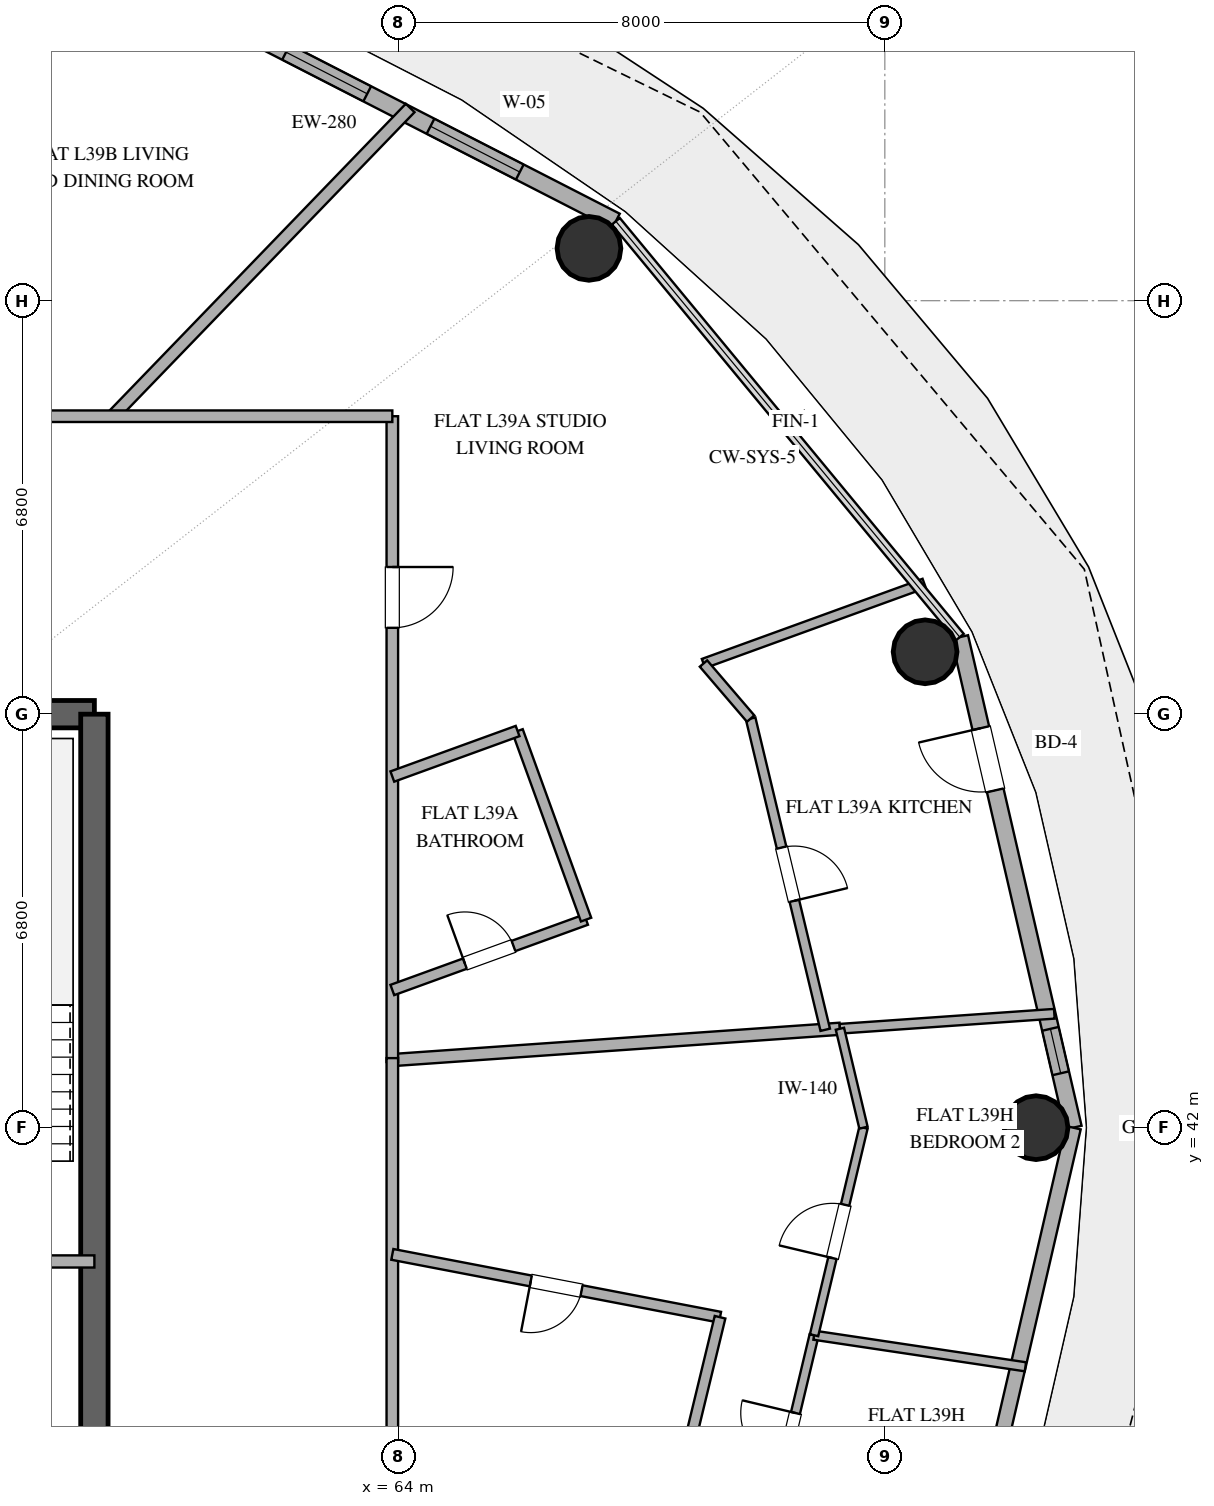
"""IFC4 building model, lengths in metres.
Left out: names, types, materials, properties, quantities, classifications, styles, units other than length and angle.
Written with IfcOpenShell. Run it as: python <this file> out.ifc"""

import sys

from ifc_helpers import new_model, si_unit, direction, frame, frame_2d, origin, origin_2d, place, context, subcontext, project, spatial, rectangle, hollow_circle, extrude, element, fill, save


model = new_model("IFC4")
c1 = context("Model", 3, precision=1e-05, world=origin(), true_north=direction((0.0, 1.0)))
c2 = subcontext(c1, "Body", "Model", "MODEL_VIEW")
j1 = project(units=[si_unit("LENGTHUNIT", "METRE"), si_unit("PLANEANGLEUNIT", "RADIAN")], contexts=[c1])
p1 = place(None, origin())
s1 = spatial("IfcSite", under=j1, at=p1, CompositionType="ELEMENT")
p2 = place(p1, origin())
s2 = spatial("IfcBuilding", under=s1, at=p2, CompositionType="ELEMENT")
p3 = place(p2, frame((0.0, 0.0, 157.8)))
s3 = spatial("IfcBuildingStorey", under=s2, at=p3, CompositionType="ELEMENT", Elevation=157.8)
p4 = place(p3, frame((55.0, 48.8, 0.0), z_axis=(0.0, 0.0, 1.0), x_axis=(1.0, 0.0, 0.0)))
e1 = element("IfcWall", 1, at=p4, inside=s3, PredefinedType="SHEAR", context=c2, shape_type="SweptSolid", body=[
    extrude(rectangle(XDim=4.0, YDim=0.45, at=frame_2d((2.0, 0.0))), origin(), (0.0, 0.0, 1.0), 3.38),
])
p5 = place(p3, frame((59.0, 35.2, 0.0), z_axis=(0.0, 0.0, 1.0), x_axis=(0.0, 1.0, 0.0)))
e2 = element("IfcWall", 2, at=p5, inside=s3, PredefinedType="SHEAR", context=c2, shape_type="SweptSolid", body=[
    extrude(rectangle(XDim=13.6, YDim=0.45, at=frame_2d((6.8, 0.0))), origin(), (0.0, 0.0, 1.0), 3.38),
])
for number, where, z_axis, x_axis in (
    (3, (74.487, 42.0, 0.0), (0.0, 0.0, 1.0), (1.0, 0.0, 0.0)),
    (4, (72.662, 49.826, 0.0), (0.0, 0.0, 1.0), (1.0, 0.0, 0.0)),
    (5, (67.134, 56.46, 0.0), (0.0, 0.0, 1.0), (1.0, 0.0, 0.0)),
):
    element("IfcColumn", number, at=place(p3, frame(where, z_axis=z_axis, x_axis=x_axis)), inside=s3, PredefinedType="COLUMN", context=c2, shape_type="SweptSolid", body=[
        extrude(hollow_circle(Radius=0.525, WallThickness=0.028, at=origin_2d()), origin(), (0.0, 0.0, 1.0), 3.38),
    ])
p6 = place(p3, frame((75.099, 42.0, 0.0), z_axis=(0.0, 0.0, 1.0), x_axis=(-0.225473184558, 0.974249374157, 0.0)))
e6 = element("IfcWall", 6, at=p6, inside=s3, PredefinedType="SOLIDWALL", context=c2, shape_type="SweptSolid", body=[
    extrude(rectangle(XDim=8.28, YDim=0.28, at=frame_2d((4.14, 0.0))), origin(), (0.0, 0.0, 1.0), 3.38),
])
p7 = place(p6, frame((5.694, 0.0, 0.0)))
e7 = element("IfcOpeningElement", 7, at=p7, cuts=e6, PredefinedType="OPENING", context=c2, shape_type="SweptSolid", body=[
    extrude(rectangle(XDim=1.05, YDim=2.2, at=frame_2d((0.525, 1.1))), frame((0.0, 0.15, 0.0), z_axis=(0.0, -1.0, 0.0), x_axis=(1.0, 0.0, 0.0)), (0.0, 0.0, 1.0), 0.3),
])
p8 = place(p6, frame((0.918, 0.0, 0.85)))
e8 = element("IfcOpeningElement", 8, at=p8, cuts=e6, PredefinedType="OPENING", context=c2, shape_type="SweptSolid", body=[
    extrude(rectangle(XDim=0.75, YDim=1.8, at=frame_2d((0.375, 0.9))), frame((0.0, 0.15, 0.0), z_axis=(0.0, -1.0, 0.0), x_axis=(1.0, 0.0, 0.0)), (0.0, 0.0, 1.0), 0.3),
])
p9 = place(p3, frame((67.576, 56.906, 0.0), z_axis=(0.0, 0.0, 1.0), x_axis=(-0.889872523182, 0.456209263919, 0.0)))
e9 = element("IfcWall", 9, at=p9, inside=s3, PredefinedType="SOLIDWALL", context=c2, shape_type="SweptSolid", body=[
    extrude(rectangle(XDim=10.016, YDim=0.28, at=frame_2d((5.008, 0.0))), origin(), (0.0, 0.0, 1.0), 3.38),
])
p10 = place(p9, frame((1.775, 0.0, 0.85)))
e10 = element("IfcOpeningElement", 10, at=p10, cuts=e9, PredefinedType="OPENING", context=c2, shape_type="SweptSolid", body=[
    extrude(rectangle(XDim=1.65, YDim=2.0, at=frame_2d((0.825, 1.0))), frame((0.0, 0.15, 0.0), z_axis=(0.0, -1.0, 0.0), x_axis=(1.0, 0.0, 0.0)), (0.0, 0.0, 1.0), 0.3),
])
p11 = place(p9, frame((4.595, 0.0, 0.85)))
e11 = element("IfcOpeningElement", 11, at=p11, cuts=e9, PredefinedType="OPENING", context=c2, shape_type="SweptSolid", body=[
    extrude(rectangle(XDim=1.5, YDim=2.0, at=frame_2d((0.75, 1.0))), frame((0.0, 0.15, 0.0), z_axis=(0.0, -1.0, 0.0), x_axis=(1.0, 0.0, 0.0)), (0.0, 0.0, 1.0), 0.3),
])
p12 = place(p9, frame((6.58, 0.0, 0.85)))
e12 = element("IfcOpeningElement", 12, at=p12, cuts=e9, PredefinedType="OPENING", context=c2, shape_type="SweptSolid", body=[
    extrude(rectangle(XDim=1.5, YDim=2.0, at=frame_2d((0.75, 1.0))), frame((0.0, 0.15, 0.0), z_axis=(0.0, -1.0, 0.0), x_axis=(1.0, 0.0, 0.0)), (0.0, 0.0, 1.0), 0.3),
])
p13 = place(p3, frame((73.232, 33.933, 0.0), z_axis=(0.0, 0.0, 1.0), x_axis=(0.225473184558, 0.974249374157, 0.0)))
e13 = element("IfcWall", 13, at=p13, inside=s3, PredefinedType="SOLIDWALL", context=c2, shape_type="SweptSolid", body=[
    extrude(rectangle(XDim=8.28, YDim=0.25, at=frame_2d((4.14, 0.0))), origin(), (0.0, 0.0, 1.0), 3.38),
])
p14 = place(p13, frame((0.886, 0.0, 0.35)))
e14 = element("IfcOpeningElement", 14, at=p14, cuts=e13, PredefinedType="OPENING", context=c2, shape_type="SweptSolid", body=[
    extrude(rectangle(XDim=1.0, YDim=1.05, at=frame_2d((0.5, 0.525))), frame((0.0, 0.135, 0.0), z_axis=(0.0, -1.0, 0.0), x_axis=(1.0, 0.0, 0.0)), (0.0, 0.0, 1.0), 0.27),
])
p15 = place(p3, frame((55.0, 39.8, 0.0), z_axis=(0.0, 0.0, 1.0), x_axis=(1.0, 0.0, 0.0)))
e15 = element("IfcWall", 15, at=p15, inside=s3, PredefinedType="SOLIDWALL", context=c2, shape_type="SweptSolid", body=[
    extrude(rectangle(XDim=4.0, YDim=0.2, at=frame_2d((2.0, 0.0))), origin(), (0.0, 0.0, 1.0), 2.74),
])
p16 = place(p15, frame((1.45, 0.0, 0.0)))
e16 = element("IfcOpeningElement", 16, at=p16, cuts=e15, PredefinedType="OPENING", context=c2, shape_type="SweptSolid", body=[
    extrude(rectangle(XDim=1.1, YDim=2.15, at=frame_2d((0.55, 1.075))), frame((0.0, 0.11, 0.0), z_axis=(0.0, -1.0, 0.0), x_axis=(1.0, 0.0, 0.0)), (0.0, 0.0, 1.0), 0.22),
])
p17 = place(p3, frame((71.261, 43.627, 0.0), z_axis=(0.0, 0.0, 1.0), x_axis=(-0.997562906323, -0.069772830877, 0.0)))
e17 = element("IfcWall", 17, at=p17, inside=s3, PredefinedType="PARTITIONING", context=c2, shape_type="SweptSolid", body=[
    extrude(rectangle(XDim=7.38, YDim=0.2, at=frame_2d((3.69, 0.0))), origin(), (0.0, 0.0, 1.0), 2.74),
])
p18 = place(p3, frame((64.194, 58.769, 0.0), z_axis=(0.0, 0.0, 1.0), x_axis=(-0.694647685064, -0.719350118952, 0.0)))
e18 = element("IfcWall", 18, at=p18, inside=s3, PredefinedType="PARTITIONING", context=c2, shape_type="SweptSolid", body=[
    extrude(rectangle(XDim=7.047, YDim=0.2, at=frame_2d((3.523, 0.0))), origin(), (0.0, 0.0, 1.0), 2.74),
])
p19 = place(p3, frame((63.9, 53.7, 0.0), z_axis=(0.0, 0.0, 1.0), x_axis=(0.0, -1.0, 0.0)))
e19 = element("IfcWall", 19, at=p19, inside=s3, PredefinedType="PARTITIONING", context=c2, shape_type="SweptSolid", body=[
    extrude(rectangle(XDim=10.62, YDim=0.19, at=frame_2d((5.31, 0.0))), origin(), (0.0, 0.0, 1.0), 2.74),
])
p20 = place(p19, frame((2.48, 0.0, 0.0)))
e20 = element("IfcOpeningElement", 20, at=p20, cuts=e19, PredefinedType="OPENING", context=c2, shape_type="SweptSolid", body=[
    extrude(rectangle(XDim=1.0, YDim=2.2, at=frame_2d((0.5, 1.1))), frame((0.0, 0.105, 0.0), z_axis=(0.0, -1.0, 0.0), x_axis=(1.0, 0.0, 0.0)), (0.0, 0.0, 1.0), 0.21),
])
p21 = place(p3, frame((49.612, 53.7, 0.0), z_axis=(0.0, 0.0, 1.0), x_axis=(1.0, 0.0, 0.0)))
e21 = element("IfcWall", 21, at=p21, inside=s3, PredefinedType="PARTITIONING", context=c2, shape_type="SweptSolid", body=[
    extrude(rectangle(XDim=14.288, YDim=0.19, at=frame_2d((7.144, 0.0))), origin(), (0.0, 0.0, 1.0), 2.74),
])
p22 = place(p21, frame((6.395, 0.0, 0.0)))
e22 = element("IfcOpeningElement", 22, at=p22, cuts=e21, PredefinedType="OPENING", context=c2, shape_type="SweptSolid", body=[
    extrude(rectangle(XDim=1.0, YDim=2.2, at=frame_2d((0.5, 1.1))), frame((0.0, 0.105, 0.0), z_axis=(0.0, -1.0, 0.0), x_axis=(1.0, 0.0, 0.0)), (0.0, 0.0, 1.0), 0.21),
])
p23 = place(p3, frame((63.9, 43.144, 0.0), z_axis=(0.0, 0.0, 1.0), x_axis=(0.0, -1.0, 0.0)))
e23 = element("IfcWall", 23, at=p23, inside=s3, PredefinedType="PARTITIONING", context=c2, shape_type="SweptSolid", body=[
    extrude(rectangle(XDim=12.844, YDim=0.19, at=frame_2d((6.422, 0.0))), origin(), (0.0, 0.0, 1.0), 2.74),
])
p24 = place(p23, frame((9.529, 0.0, 0.0)))
e24 = element("IfcOpeningElement", 24, at=p24, cuts=e23, PredefinedType="OPENING", context=c2, shape_type="SweptSolid", body=[
    extrude(rectangle(XDim=1.0, YDim=2.2, at=frame_2d((0.5, 1.1))), frame((0.0, 0.105, 0.0), z_axis=(0.0, -1.0, 0.0), x_axis=(1.0, 0.0, 0.0)), (0.0, 0.0, 1.0), 0.21),
])
p25 = place(p3, frame((69.29, 38.883, 0.0), z_axis=(0.0, 0.0, 1.0), x_axis=(-0.98210182834, 0.188350733396, 0.0)))
e25 = element("IfcWall", 25, at=p25, inside=s3, PredefinedType="PLUMBINGWALL", context=c2, shape_type="SweptSolid", body=[
    extrude(rectangle(XDim=5.488, YDim=0.18, at=frame_2d((2.744, 0.0))), origin(), (0.0, 0.0, 1.0), 2.74),
])
p26 = place(p25, frame((2.319, 0.0, 0.0)))
e26 = element("IfcOpeningElement", 26, at=p26, cuts=e25, PredefinedType="OPENING", context=c2, shape_type="SweptSolid", body=[
    extrude(rectangle(XDim=0.85, YDim=2.1, at=frame_2d((0.425, 1.05))), frame((0.0, 0.1, 0.0), z_axis=(0.0, -1.0, 0.0), x_axis=(1.0, 0.0, 0.0)), (0.0, 0.0, 1.0), 0.2),
])
p27 = place(p3, frame((69.793, 48.728, 0.0), z_axis=(0.0, 0.0, 1.0), x_axis=(0.23310450522, -0.972451690135, 0.0)))
e27 = element("IfcWall", 27, at=p27, inside=s3, PredefinedType="PLUMBINGWALL", context=c2, shape_type="SweptSolid", body=[
    extrude(rectangle(XDim=5.263, YDim=0.16, at=frame_2d((2.631, 0.0))), origin(), (0.0, 0.0, 1.0), 2.74),
])
p28 = place(p27, frame((2.181, 0.0, 0.0)))
e28 = element("IfcOpeningElement", 28, at=p28, cuts=e27, PredefinedType="OPENING", context=c2, shape_type="SweptSolid", body=[
    extrude(rectangle(XDim=0.9, YDim=2.1, at=frame_2d((0.45, 1.05))), frame((0.0, 0.09, 0.0), z_axis=(0.0, -1.0, 0.0), x_axis=(1.0, 0.0, 0.0)), (0.0, 0.0, 1.0), 0.18),
])
p29 = place(p3, frame((72.647, 50.951, 0.0), z_axis=(0.0, 0.0, 1.0), x_axis=(-0.939926248806, -0.341377572206, 0.0)))
e29 = element("IfcWall", 29, at=p29, inside=s3, PredefinedType="PLUMBINGWALL", context=c2, shape_type="SweptSolid", body=[
    extrude(rectangle(XDim=3.862, YDim=0.16, at=frame_2d((1.931, 0.0))), origin(), (0.0, 0.0, 1.0), 2.74),
])
p30 = place(p3, frame((71.261, 43.627, 0.0), z_axis=(0.0, 0.0, 1.0), x_axis=(0.997563824095, 0.069759707979, 0.0)))
e30 = element("IfcWall", 30, at=p30, inside=s3, PredefinedType="PLUMBINGWALL", context=c2, shape_type="SweptSolid", body=[
    extrude(rectangle(XDim=3.535, YDim=0.16, at=frame_2d((1.767, 0.0))), origin(), (0.0, 0.0, 1.0), 2.74),
])
p31 = place(p3, frame((70.015, 35.153, 0.0), z_axis=(0.0, 0.0, 1.0), x_axis=(0.232452361323, 0.972607783084, 0.0)))
e31 = element("IfcWall", 31, at=p31, inside=s3, PredefinedType="PARTITIONING", context=c2, shape_type="SweptSolid", body=[
    extrude(rectangle(XDim=3.531, YDim=0.15, at=frame_2d((1.766, 0.0))), origin(), (0.0, 0.0, 1.0), 2.74),
])
p32 = place(p31, frame((1.315, 0.0, 0.0)))
e32 = element("IfcOpeningElement", 32, at=p32, cuts=e31, PredefinedType="OPENING", context=c2, shape_type="SweptSolid", body=[
    extrude(rectangle(XDim=0.9, YDim=2.1, at=frame_2d((0.45, 1.05))), frame((0.0, 0.085, 0.0), z_axis=(0.0, -1.0, 0.0), x_axis=(1.0, 0.0, 0.0)), (0.0, 0.0, 1.0), 0.17),
])
p33 = place(p3, frame((74.312, 38.068, 0.0), z_axis=(0.0, 0.0, 1.0), x_axis=(-0.989013160958, 0.147827492205, 0.0)))
e33 = element("IfcWall", 33, at=p33, inside=s3, PredefinedType="PARTITIONING", context=c2, shape_type="SweptSolid", body=[
    extrude(rectangle(XDim=3.514, YDim=0.15, at=frame_2d((1.757, 0.0))), origin(), (0.0, 0.0, 1.0), 2.74),
])
p34 = place(p3, frame((70.836, 38.587, 0.0), z_axis=(0.0, 0.0, 1.0), x_axis=(0.231598574747, 0.972811441223, 0.0)))
e34 = element("IfcWall", 34, at=p34, inside=s3, PredefinedType="PARTITIONING", context=c2, shape_type="SweptSolid", body=[
    extrude(rectangle(XDim=3.508, YDim=0.14, at=frame_2d((1.754, 0.0))), origin(), (0.0, 0.0, 1.0), 2.74),
])
p35 = place(p34, frame((1.304, 0.0, 0.0)))
e35 = element("IfcOpeningElement", 35, at=p35, cuts=e34, PredefinedType="OPENING", context=c2, shape_type="SweptSolid", body=[
    extrude(rectangle(XDim=0.9, YDim=2.1, at=frame_2d((0.45, 1.05))), frame((0.0, 0.08, 0.0), z_axis=(0.0, -1.0, 0.0), x_axis=(1.0, 0.0, 0.0)), (0.0, 0.0, 1.0), 0.16),
])
p36 = place(p3, frame((63.9, 44.264, 0.0), z_axis=(0.0, 0.0, 1.0), x_axis=(0.939936319397, 0.341349843238, 0.0)))
e36 = element("IfcWall", 36, at=p36, inside=s3, PredefinedType="PLUMBINGWALL", context=c2, shape_type="SweptSolid", body=[
    extrude(rectangle(XDim=3.39, YDim=0.18, at=frame_2d((1.695, 0.0))), origin(), (0.0, 0.0, 1.0), 2.74),
])
p37 = place(p36, frame((1.27, 0.0, 0.0)))
e37 = element("IfcOpeningElement", 37, at=p37, cuts=e36, PredefinedType="OPENING", context=c2, shape_type="SweptSolid", body=[
    extrude(rectangle(XDim=0.85, YDim=2.1, at=frame_2d((0.425, 1.05))), frame((0.0, 0.1, 0.0), z_axis=(0.0, -1.0, 0.0), x_axis=(1.0, 0.0, 0.0)), (0.0, 0.0, 1.0), 0.2),
])
p38 = place(p3, frame((67.086, 45.421, 0.0), z_axis=(0.0, 0.0, 1.0), x_axis=(-0.341333094487, 0.93994240175, 0.0)))
e38 = element("IfcWall", 38, at=p38, inside=s3, PredefinedType="PLUMBINGWALL", context=c2, shape_type="SweptSolid", body=[
    extrude(rectangle(XDim=3.3, YDim=0.18, at=frame_2d((1.65, 0.0))), origin(), (0.0, 0.0, 1.0), 2.74),
])
p39 = place(p3, frame((68.526, 35.732, 0.0), z_axis=(0.0, 0.0, 1.0), x_axis=(0.235531062042, 0.971866821541, 0.0)))
e39 = element("IfcWall", 39, at=p39, inside=s3, PredefinedType="PLUMBINGWALL", context=c2, shape_type="SweptSolid", body=[
    extrude(rectangle(XDim=3.242, YDim=0.18, at=frame_2d((1.621, 0.0))), origin(), (0.0, 0.0, 1.0), 2.74),
])
p40 = place(p3, frame((65.96, 48.523, 0.0), z_axis=(0.0, 0.0, 1.0), x_axis=(-0.939962415694, -0.341277976263, 0.0)))
e40 = element("IfcWall", 40, at=p40, inside=s3, PredefinedType="PLUMBINGWALL", context=c2, shape_type="SweptSolid", body=[
    extrude(rectangle(XDim=2.192, YDim=0.18, at=frame_2d((1.096, 0.0))), origin(), (0.0, 0.0, 1.0), 2.74),
])
p41 = place(p3, frame((71.649, 42.0, 0.0), z_axis=(0.0, 0.0, 1.0), x_axis=(-0.231561310927, 0.972820311919, 0.0)))
e41 = element("IfcWall", 41, at=p41, inside=s3, PredefinedType="PARTITIONING", context=c2, shape_type="SweptSolid", body=[
    extrude(rectangle(XDim=1.672, YDim=0.14, at=frame_2d((0.836, 0.0))), origin(), (0.0, 0.0, 1.0), 2.74),
])
p42 = place(p3, frame((69.018, 49.633, 0.0), z_axis=(0.0, 0.0, 1.0), x_axis=(0.650538392346, -0.759473370227, 0.0)))
e42 = element("IfcWall", 42, at=p42, inside=s3, PredefinedType="PLUMBINGWALL", context=c2, shape_type="SweptSolid", body=[
    extrude(rectangle(XDim=1.192, YDim=0.16, at=frame_2d((0.596, 0.0))), origin(), (0.0, 0.0, 1.0), 2.74),
])
p43 = place(p7, origin())
e43 = element("IfcDoor", 43, at=p43, inside=s3, OperationType="SINGLE_SWING_RIGHT", PredefinedType="DOOR", context=c2, shape_type="SweptSolid", body=[
    extrude(rectangle(XDim=1.05, YDim=2.2, at=frame_2d((0.525, 1.1))), frame((0.0, 0.025, 0.0), z_axis=(0.0, -1.0, 0.0), x_axis=(1.0, 0.0, 0.0)), (0.0, 0.0, 1.0), 0.05),
])
fill(e7, e43)
p44 = place(p10, origin())
e44 = element("IfcWindow", 44, at=p44, inside=s3, PartitioningType="SINGLE_PANEL", PredefinedType="WINDOW", context=c2, shape_type="SweptSolid", body=[
    extrude(rectangle(XDim=1.65, YDim=2.0, at=frame_2d((0.825, 1.0))), frame((0.0, 0.03, 0.0), z_axis=(0.0, -1.0, 0.0), x_axis=(1.0, 0.0, 0.0)), (0.0, 0.0, 1.0), 0.06),
])
fill(e10, e44)
p45 = place(p11, origin())
e45 = element("IfcWindow", 45, at=p45, inside=s3, PartitioningType="SINGLE_PANEL", PredefinedType="WINDOW", context=c2, shape_type="SweptSolid", body=[
    extrude(rectangle(XDim=1.5, YDim=2.0, at=frame_2d((0.75, 1.0))), frame((0.0, 0.03, 0.0), z_axis=(0.0, -1.0, 0.0), x_axis=(1.0, 0.0, 0.0)), (0.0, 0.0, 1.0), 0.06),
])
fill(e11, e45)
p46 = place(p8, origin())
e46 = element("IfcWindow", 46, at=p46, inside=s3, PartitioningType="SINGLE_PANEL", PredefinedType="WINDOW", context=c2, shape_type="SweptSolid", body=[
    extrude(rectangle(XDim=0.75, YDim=1.8, at=frame_2d((0.375, 0.9))), frame((0.0, 0.03, 0.0), z_axis=(0.0, -1.0, 0.0), x_axis=(1.0, 0.0, 0.0)), (0.0, 0.0, 1.0), 0.06),
])
fill(e8, e46)
p47 = place(p20, origin())
e47 = element("IfcDoor", 47, at=p47, inside=s3, OperationType="SINGLE_SWING_LEFT", PredefinedType="DOOR", context=c2, shape_type="SweptSolid", body=[
    extrude(rectangle(XDim=1.0, YDim=2.2, at=frame_2d((0.5, 1.1))), frame((0.0, 0.025, 0.0), z_axis=(0.0, -1.0, 0.0), x_axis=(1.0, 0.0, 0.0)), (0.0, 0.0, 1.0), 0.05),
])
fill(e20, e47)
p48 = place(p26, origin())
e48 = element("IfcDoor", 48, at=p48, inside=s3, OperationType="SINGLE_SWING_RIGHT", PredefinedType="DOOR", context=c2, shape_type="SweptSolid", body=[
    extrude(rectangle(XDim=0.85, YDim=2.1, at=frame_2d((0.425, 1.05))), frame((0.0, 0.025, 0.0), z_axis=(0.0, -1.0, 0.0), x_axis=(1.0, 0.0, 0.0)), (0.0, 0.0, 1.0), 0.05),
])
fill(e26, e48)
p49 = place(p28, origin())
e49 = element("IfcDoor", 49, at=p49, inside=s3, OperationType="SINGLE_SWING_RIGHT", PredefinedType="DOOR", context=c2, shape_type="SweptSolid", body=[
    extrude(rectangle(XDim=0.9, YDim=2.1, at=frame_2d((0.45, 1.05))), frame((0.0, 0.025, 0.0), z_axis=(0.0, -1.0, 0.0), x_axis=(1.0, 0.0, 0.0)), (0.0, 0.0, 1.0), 0.05),
])
fill(e28, e49)
p50 = place(p32, origin())
e50 = element("IfcDoor", 50, at=p50, inside=s3, OperationType="SINGLE_SWING_RIGHT", PredefinedType="DOOR", context=c2, shape_type="SweptSolid", body=[
    extrude(rectangle(XDim=0.9, YDim=2.1, at=frame_2d((0.45, 1.05))), frame((0.0, 0.025, 0.0), z_axis=(0.0, -1.0, 0.0), x_axis=(1.0, 0.0, 0.0)), (0.0, 0.0, 1.0), 0.05),
])
fill(e32, e50)
p51 = place(p35, origin())
e51 = element("IfcDoor", 51, at=p51, inside=s3, OperationType="SINGLE_SWING_LEFT", PredefinedType="DOOR", context=c2, shape_type="SweptSolid", body=[
    extrude(rectangle(XDim=0.9, YDim=2.1, at=frame_2d((0.45, 1.05))), frame((0.0, 0.025, 0.0), z_axis=(0.0, -1.0, 0.0), x_axis=(1.0, 0.0, 0.0)), (0.0, 0.0, 1.0), 0.05),
])
fill(e35, e51)
p52 = place(p37, origin())
e52 = element("IfcDoor", 52, at=p52, inside=s3, OperationType="SINGLE_SWING_LEFT", PredefinedType="DOOR", context=c2, shape_type="SweptSolid", body=[
    extrude(rectangle(XDim=0.85, YDim=2.1, at=frame_2d((0.425, 1.05))), frame((0.0, 0.025, 0.0), z_axis=(0.0, -1.0, 0.0), x_axis=(1.0, 0.0, 0.0)), (0.0, 0.0, 1.0), 0.05),
])
fill(e37, e52)
save(model, sys.argv[1])
